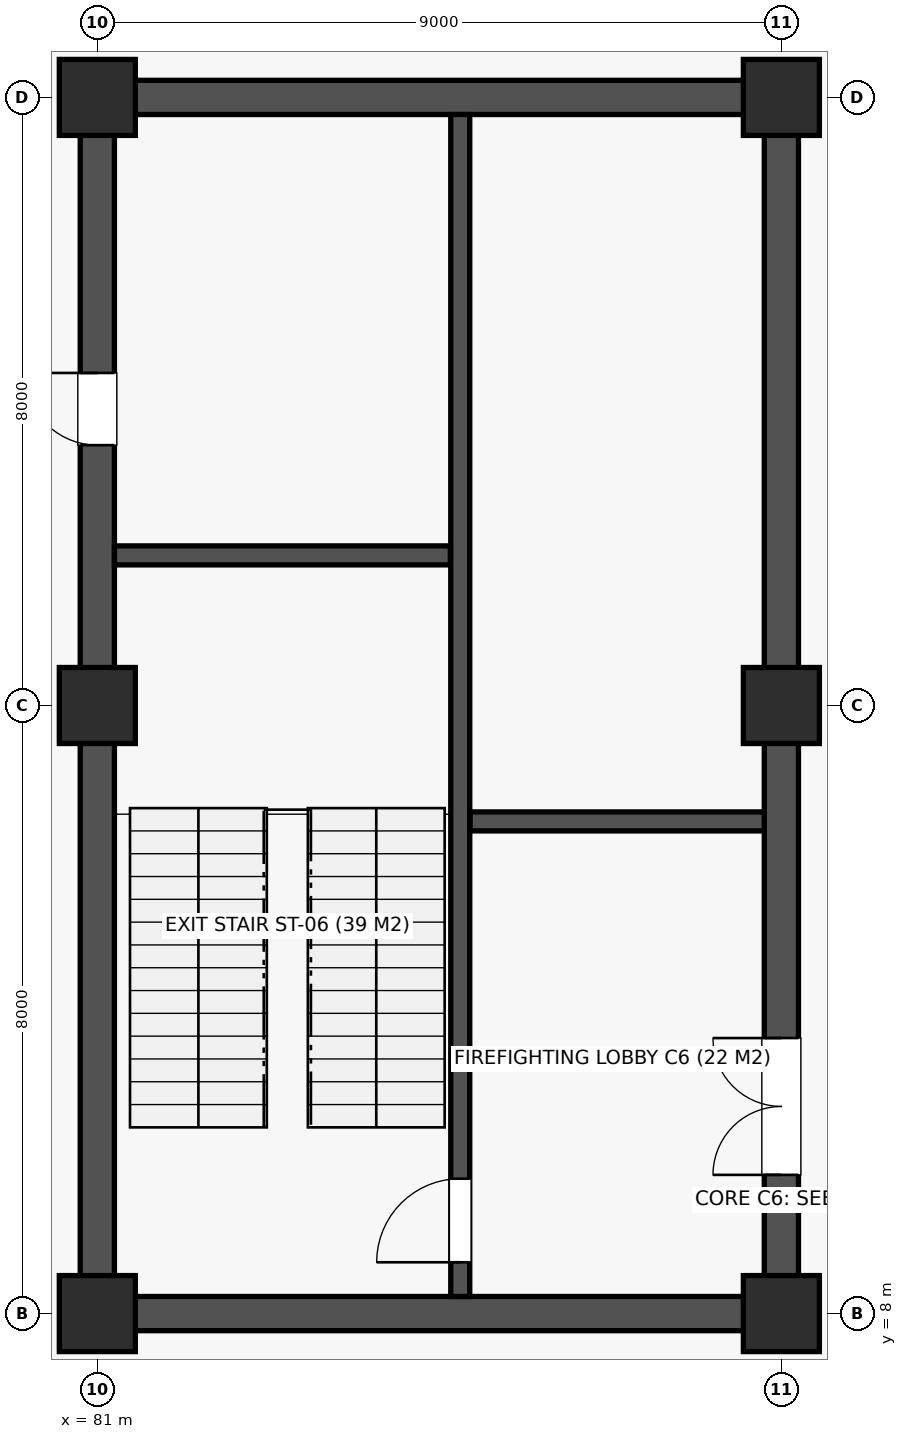
"""IFC4 building model, lengths in metres.
Left out: names, types, materials, properties, quantities, classifications, styles, units other than length and angle.
Written with IfcOpenShell. Run it as: python <this file> out.ifc"""

import sys

from ifc_helpers import new_model, si_unit, direction, frame, frame_2d, origin, origin_2d, place, context, subcontext, project, spatial, rectangle, extrude, element, fill, save


model = new_model("IFC4")
c1 = context("Model", 3, precision=1e-05, world=origin(), true_north=direction((0.0, 1.0)))
c2 = subcontext(c1, "Body", "Model", "MODEL_VIEW")
j1 = project(units=[si_unit("LENGTHUNIT", "METRE"), si_unit("PLANEANGLEUNIT", "RADIAN")], contexts=[c1])
p1 = place(None, origin())
s1 = spatial("IfcSite", under=j1, at=p1, CompositionType="ELEMENT")
p2 = place(p1, origin())
s2 = spatial("IfcBuilding", under=s1, at=p2, CompositionType="ELEMENT")
p3 = place(p2, frame((0.0, 0.0, -9.0)))
s3 = spatial("IfcBuildingStorey", under=s2, at=p3, CompositionType="ELEMENT", Elevation=-9.0)
for number, where, z_axis, x_axis in (
    (1, (81.0, 8.0, 0.0), (0.0, 0.0, 1.0), (1.0, 0.0, 0.0)),
    (2, (81.0, 16.0, 0.0), (0.0, 0.0, 1.0), (1.0, 0.0, 0.0)),
    (3, (81.0, 24.0, 0.0), (0.0, 0.0, 1.0), (1.0, 0.0, 0.0)),
    (4, (90.0, 8.0, 0.0), (0.0, 0.0, 1.0), (1.0, 0.0, 0.0)),
    (5, (90.0, 16.0, 0.0), (0.0, 0.0, 1.0), (1.0, 0.0, 0.0)),
    (6, (90.0, 24.0, 0.0), (0.0, 0.0, 1.0), (1.0, 0.0, 0.0)),
):
    element("IfcColumn", number, at=place(p3, frame(where, z_axis=z_axis, x_axis=x_axis)), inside=s3, PredefinedType="COLUMN", context=c2, shape_type="SweptSolid", body=[
        extrude(rectangle(XDim=1.0, YDim=1.0, at=origin_2d()), origin(), (0.0, 0.0, 1.0), 4.5),
    ])
for number, where, z_axis, x_axis in (
    (7, (81.225, 8.0, 0.0), (0.0, 0.0, 1.0), (1.0, 0.0, 0.0)),
    (8, (81.225, 24.0, 0.0), (0.0, 0.0, 1.0), (1.0, 0.0, 0.0)),
):
    element("IfcWall", number, at=place(p3, frame(where, z_axis=z_axis, x_axis=x_axis)), inside=s3, PredefinedType="SHEAR", context=c2, shape_type="SweptSolid", body=[
        extrude(rectangle(XDim=8.55, YDim=0.45, at=frame_2d((4.275, 0.0))), origin(), (0.0, 0.0, 1.0), 4.2),
    ])
p4 = place(p3, frame((81.0, 8.225, 0.0), z_axis=(0.0, 0.0, 1.0), x_axis=(0.0, 1.0, 0.0)))
e9 = element("IfcWall", 9, at=p4, inside=s3, PredefinedType="SHEAR", context=c2, shape_type="SweptSolid", body=[
    extrude(rectangle(XDim=15.55, YDim=0.45, at=frame_2d((7.775, 0.0))), origin(), (0.0, 0.0, 1.0), 4.2),
])
p5 = place(p4, frame((11.2, 0.0, 0.0)))
e10 = element("IfcOpeningElement", 10, at=p5, cuts=e9, PredefinedType="OPENING", context=c2, shape_type="SweptSolid", body=[
    extrude(rectangle(XDim=0.95, YDim=2.1, at=frame_2d((0.475, 1.05))), frame((0.0, 0.237, 0.0), z_axis=(0.0, -1.0, 0.0), x_axis=(1.0, 0.0, 0.0)), (0.0, 0.0, 1.0), 0.474),
])
p6 = place(p3, frame((90.0, 8.225, 0.0), z_axis=(0.0, 0.0, 1.0), x_axis=(0.0, 1.0, 0.0)))
e11 = element("IfcWall", 11, at=p6, inside=s3, PredefinedType="SHEAR", context=c2, shape_type="SweptSolid", body=[
    extrude(rectangle(XDim=15.55, YDim=0.45, at=frame_2d((7.775, 0.0))), origin(), (0.0, 0.0, 1.0), 4.2),
])
p7 = place(p6, frame((1.6, 0.0, 0.0)))
e12 = element("IfcOpeningElement", 12, at=p7, cuts=e11, PredefinedType="OPENING", context=c2, shape_type="SweptSolid", body=[
    extrude(rectangle(XDim=1.8, YDim=2.18, at=frame_2d((0.9, 1.09))), frame((0.0, 0.237, 0.0), z_axis=(0.0, -1.0, 0.0), x_axis=(1.0, 0.0, 0.0)), (0.0, 0.0, 1.0), 0.474),
])
p8 = place(p3, frame((85.775, 8.225, 0.0), z_axis=(0.0, 0.0, 1.0), x_axis=(0.0, 1.0, 0.0)))
e13 = element("IfcWall", 13, at=p8, inside=s3, PredefinedType="SOLIDWALL", context=c2, shape_type="SweptSolid", body=[
    extrude(rectangle(XDim=15.55, YDim=0.25, at=frame_2d((7.775, 0.0))), origin(), (0.0, 0.0, 1.0), 4.2),
])
p9 = place(p8, frame((0.45, 0.0, 0.0)))
e14 = element("IfcOpeningElement", 14, at=p9, cuts=e13, PredefinedType="OPENING", context=c2, shape_type="SweptSolid", body=[
    extrude(rectangle(XDim=1.1, YDim=2.15, at=frame_2d((0.55, 1.075))), frame((0.0, 0.137, 0.0), z_axis=(0.0, -1.0, 0.0), x_axis=(1.0, 0.0, 0.0)), (0.0, 0.0, 1.0), 0.274),
])
p10 = place(p3, frame((81.225, 17.975, 0.0), z_axis=(0.0, 0.0, 1.0), x_axis=(1.0, 0.0, 0.0)))
e15 = element("IfcWall", 15, at=p10, inside=s3, PredefinedType="SOLIDWALL", context=c2, shape_type="SweptSolid", body=[
    extrude(rectangle(XDim=4.42, YDim=0.25, at=frame_2d((2.21, 0.0))), origin(), (0.0, 0.0, 1.0), 4.2),
])
p11 = place(p3, frame((85.905, 14.475, 0.0), z_axis=(0.0, 0.0, 1.0), x_axis=(1.0, 0.0, 0.0)))
e16 = element("IfcWall", 16, at=p11, inside=s3, PredefinedType="SOLIDWALL", context=c2, shape_type="SweptSolid", body=[
    extrude(rectangle(XDim=3.87, YDim=0.25, at=frame_2d((1.935, 0.0))), origin(), (0.0, 0.0, 1.0), 4.2),
])
p12 = place(p7, origin())
e17 = element("IfcDoor", 17, at=p12, inside=s3, OperationType="DOUBLE_DOOR_SINGLE_SWING", PredefinedType="DOOR", context=c2, shape_type="SweptSolid", body=[
    extrude(rectangle(XDim=1.8, YDim=2.18, at=frame_2d((0.9, 1.09))), frame((0.0, 0.025, 0.0), z_axis=(0.0, -1.0, 0.0), x_axis=(1.0, 0.0, 0.0)), (0.0, 0.0, 1.0), 0.05),
])
fill(e12, e17)
p13 = place(p9, origin())
e18 = element("IfcDoor", 18, at=p13, inside=s3, OperationType="SINGLE_SWING_LEFT", PredefinedType="DOOR", context=c2, shape_type="SweptSolid", body=[
    extrude(rectangle(XDim=1.1, YDim=2.15, at=frame_2d((0.55, 1.075))), frame((0.0, 0.025, 0.0), z_axis=(0.0, -1.0, 0.0), x_axis=(1.0, 0.0, 0.0)), (0.0, 0.0, 1.0), 0.05),
])
fill(e14, e18)
p14 = place(p5, origin())
e19 = element("IfcDoor", 19, at=p14, inside=s3, OperationType="SINGLE_SWING_RIGHT", PredefinedType="DOOR", context=c2, shape_type="SweptSolid", body=[
    extrude(rectangle(XDim=0.95, YDim=2.1, at=frame_2d((0.475, 1.05))), frame((0.0, 0.025, 0.0), z_axis=(0.0, -1.0, 0.0), x_axis=(1.0, 0.0, 0.0)), (0.0, 0.0, 1.0), 0.05),
])
fill(e10, e19)
save(model, sys.argv[1])
